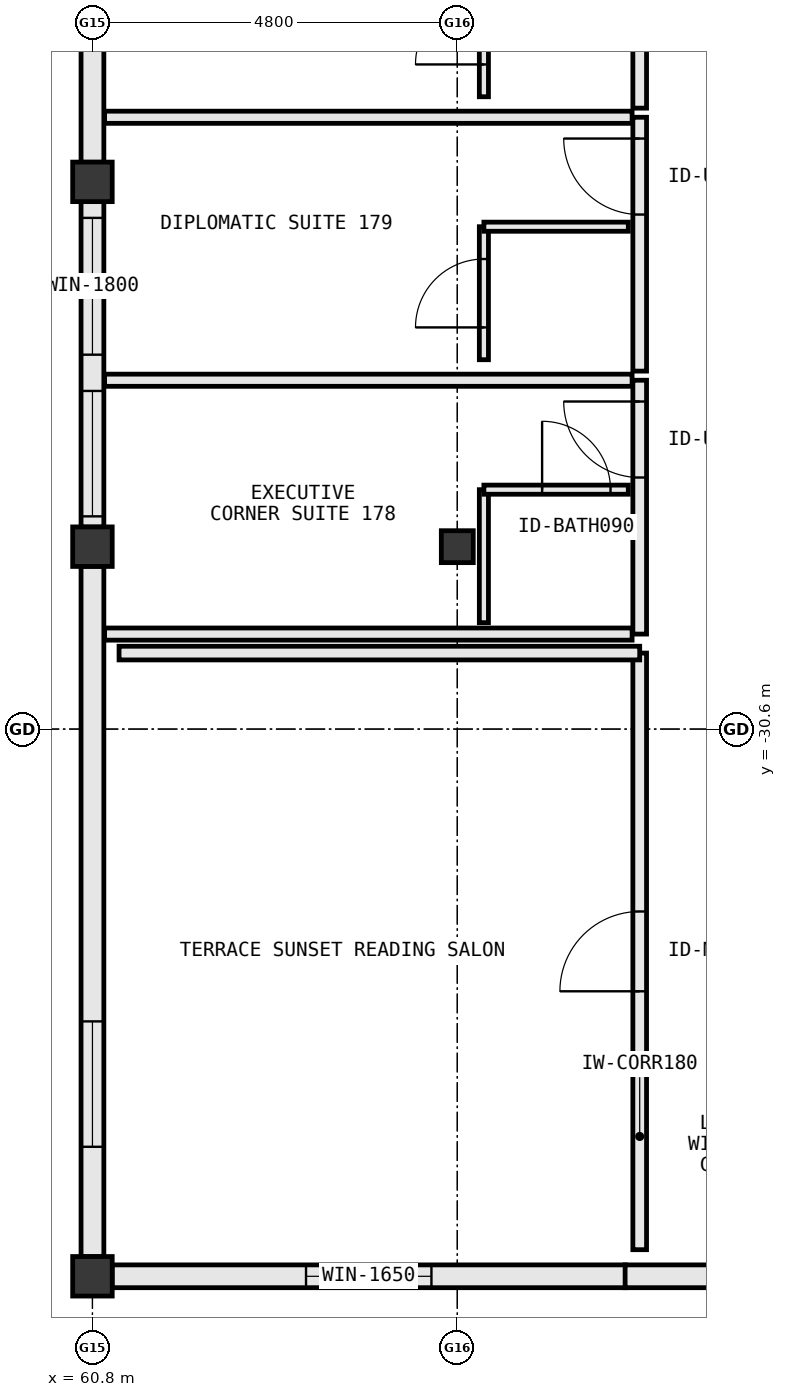
"""IFC4 building model, lengths in metres.
Left out: names, types, materials, properties, quantities, classifications, styles, units other than length and angle.
Written with IfcOpenShell. Run it as: python <this file> out.ifc"""

import sys

from ifc_helpers import new_model, si_unit, direction, frame, frame_2d, origin, origin_2d, place, context, subcontext, project, spatial, rectangle, extrude, element, fill, save


model = new_model("IFC4")
c1 = context("Model", 3, precision=1e-05, world=origin(), true_north=direction((0.0, 1.0)))
c2 = subcontext(c1, "Body", "Model", "MODEL_VIEW")
j1 = project(units=[si_unit("LENGTHUNIT", "METRE"), si_unit("PLANEANGLEUNIT", "RADIAN")], contexts=[c1])
p1 = place(None, origin())
s1 = spatial("IfcSite", under=j1, at=p1, CompositionType="ELEMENT")
p2 = place(p1, origin())
s2 = spatial("IfcBuilding", under=s1, at=p2, CompositionType="ELEMENT")
p3 = place(p2, frame((0.0, 0.0, 27.6)))
s3 = spatial("IfcBuildingStorey", under=s2, at=p3, CompositionType="ELEMENT", Elevation=27.6)
for number, where, z_axis, x_axis in (
    (1, (60.8, -37.8, 0.0), (0.0, 0.0, 1.0), (1.0, 0.0, 0.0)),
    (2, (60.8, -28.2, 0.0), (0.0, 0.0, 1.0), (1.0, 0.0, 0.0)),
    (3, (60.8, -23.4, 0.0), (0.0, 0.0, 1.0), (1.0, 0.0, 0.0)),
):
    element("IfcColumn", number, at=place(p3, frame(where, z_axis=z_axis, x_axis=x_axis)), inside=s3, PredefinedType="COLUMN", context=c2, shape_type="SweptSolid", body=[
        extrude(rectangle(XDim=0.52, YDim=0.52, at=origin_2d()), origin(), (0.0, 0.0, 1.0), 3.8),
    ])
p4 = place(p3, frame((65.6, -28.2, 0.0), z_axis=(0.0, 0.0, 1.0), x_axis=(1.0, 0.0, 0.0)))
e4 = element("IfcColumn", 4, at=p4, inside=s3, PredefinedType="COLUMN", context=c2, shape_type="SweptSolid", body=[
    extrude(rectangle(XDim=0.42, YDim=0.42, at=origin_2d()), origin(), (0.0, 0.0, 1.0), 3.8),
])
p5 = place(p3, frame((61.058, -37.8, 0.0), z_axis=(0.0, 0.0, 1.0), x_axis=(1.0, 0.0, 0.0)))
e5 = element("IfcWall", 5, at=p5, inside=s3, PredefinedType="STANDARD", context=c2, shape_type="SweptSolid", body=[
    extrude(rectangle(XDim=6.754, YDim=0.3, at=frame_2d((3.377, 0.0))), origin(), (0.0, 0.0, 1.0), 2.83),
])
p6 = place(p5, frame((2.552, 0.0, 0.85)))
e6 = element("IfcOpeningElement", 6, at=p6, cuts=e5, PredefinedType="OPENING", context=c2, shape_type="SweptSolid", body=[
    extrude(rectangle(XDim=1.65, YDim=1.8, at=frame_2d((0.825, 0.9))), frame((0.0, 0.162, 0.0), z_axis=(0.0, -1.0, 0.0), x_axis=(1.0, 0.0, 0.0)), (0.0, 0.0, 1.0), 0.324),
])
p7 = place(p3, frame((67.808, -37.8, 0.0), z_axis=(0.0, 0.0, 1.0), x_axis=(1.0, 0.0, 0.0)))
e7 = element("IfcWall", 7, at=p7, inside=s3, PredefinedType="STANDARD", context=c2, shape_type="SweptSolid", body=[
    extrude(rectangle(XDim=6.754, YDim=0.3, at=frame_2d((3.377, 0.0))), origin(), (0.0, 0.0, 1.0), 2.83),
])
p8 = place(p3, frame((60.8, -18.858, 0.0), z_axis=(0.0, 0.0, 1.0), x_axis=(0.0, -1.0, 0.0)))
e8 = element("IfcWall", 8, at=p8, inside=s3, PredefinedType="STANDARD", context=c2, shape_type="SweptSolid", body=[
    extrude(rectangle(XDim=4.284, YDim=0.3, at=frame_2d((2.142, 0.0))), origin(), (0.0, 0.0, 1.0), 3.01),
])
p9 = place(p8, frame((1.002, 0.0, 0.85)))
e9 = element("IfcOpeningElement", 9, at=p9, cuts=e8, PredefinedType="OPENING", context=c2, shape_type="SweptSolid", body=[
    extrude(rectangle(XDim=1.8, YDim=1.85, at=frame_2d((0.9, 0.925))), frame((0.0, 0.162, 0.0), z_axis=(0.0, -1.0, 0.0), x_axis=(1.0, 0.0, 0.0)), (0.0, 0.0, 1.0), 0.324),
])
p10 = place(p3, frame((60.8, -23.658, 0.0), z_axis=(0.0, 0.0, 1.0), x_axis=(0.0, -1.0, 0.0)))
e10 = element("IfcWall", 10, at=p10, inside=s3, PredefinedType="STANDARD", context=c2, shape_type="SweptSolid", body=[
    extrude(rectangle(XDim=4.284, YDim=0.3, at=frame_2d((2.142, 0.0))), origin(), (0.0, 0.0, 1.0), 3.01),
])
p11 = place(p10, frame((2.493, 0.0, 0.85)))
e11 = element("IfcOpeningElement", 11, at=p11, cuts=e10, PredefinedType="OPENING", context=c2, shape_type="SweptSolid", body=[
    extrude(rectangle(XDim=1.65, YDim=1.8, at=frame_2d((0.825, 0.9))), frame((0.0, 0.162, 0.0), z_axis=(0.0, -1.0, 0.0), x_axis=(1.0, 0.0, 0.0)), (0.0, 0.0, 1.0), 0.324),
])
p12 = place(p10, frame((0.216, 0.0, 0.85)))
e12 = element("IfcOpeningElement", 12, at=p12, cuts=e10, PredefinedType="OPENING", context=c2, shape_type="SweptSolid", body=[
    extrude(rectangle(XDim=1.8, YDim=1.85, at=frame_2d((0.9, 0.925))), frame((0.0, 0.162, 0.0), z_axis=(0.0, -1.0, 0.0), x_axis=(1.0, 0.0, 0.0)), (0.0, 0.0, 1.0), 0.324),
])
p13 = place(p3, frame((60.8, -28.458, 0.0), z_axis=(0.0, 0.0, 1.0), x_axis=(0.0, -1.0, 0.0)))
e13 = element("IfcWall", 13, at=p13, inside=s3, PredefinedType="STANDARD", context=c2, shape_type="SweptSolid", body=[
    extrude(rectangle(XDim=9.084, YDim=0.3, at=frame_2d((4.542, 0.0))), origin(), (0.0, 0.0, 1.0), 2.91),
])
p14 = place(p13, frame((5.988, 0.0, 0.85)))
e14 = element("IfcOpeningElement", 14, at=p14, cuts=e13, PredefinedType="OPENING", context=c2, shape_type="SweptSolid", body=[
    extrude(rectangle(XDim=1.65, YDim=1.8, at=frame_2d((0.825, 0.9))), frame((0.0, 0.162, 0.0), z_axis=(0.0, -1.0, 0.0), x_axis=(1.0, 0.0, 0.0)), (0.0, 0.0, 1.0), 0.324),
])
p15 = place(p3, frame((68.0, -37.45, 0.0), z_axis=(0.0, 0.0, 1.0), x_axis=(0.0, 1.0, 0.0)))
e15 = element("IfcWall", 15, at=p15, inside=s3, PredefinedType="PARTITIONING", context=c2, shape_type="SweptSolid", body=[
    extrude(rectangle(XDim=7.85, YDim=0.18, at=frame_2d((3.925, 0.0))), origin(), (0.0, 0.0, 1.0), 3.555),
])
p16 = place(p15, frame((3.4, 0.0, 0.0)))
e16 = element("IfcOpeningElement", 16, at=p16, cuts=e15, PredefinedType="OPENING", context=c2, shape_type="SweptSolid", body=[
    extrude(rectangle(XDim=1.05, YDim=2.2, at=frame_2d((0.525, 1.1))), frame((0.0, 0.102, 0.0), z_axis=(0.0, -1.0, 0.0), x_axis=(1.0, 0.0, 0.0)), (0.0, 0.0, 1.0), 0.204),
])
p17 = place(p3, frame((68.0, -29.6, 0.0), z_axis=(0.0, 0.0, 1.0), x_axis=(-1.0, 0.0, 0.0)))
e17 = element("IfcWall", 17, at=p17, inside=s3, PredefinedType="PARTITIONING", context=c2, shape_type="SweptSolid", body=[
    extrude(rectangle(XDim=6.85, YDim=0.18, at=frame_2d((3.425, 0.0))), origin(), (0.0, 0.0, 1.0), 3.555),
])
p18 = place(p3, frame((68.0, -29.35, 0.0), z_axis=(0.0, 0.0, 1.0), x_axis=(0.0, 1.0, 0.0)))
e18 = element("IfcWall", 18, at=p18, inside=s3, PredefinedType="PARTITIONING", context=c2, shape_type="SweptSolid", body=[
    extrude(rectangle(XDim=3.34, YDim=0.18, at=frame_2d((1.67, 0.0))), origin(), (0.0, 0.0, 1.0), 3.555),
])
p19 = place(p18, frame((2.06, 0.0, 0.0)))
e19 = element("IfcOpeningElement", 19, at=p19, cuts=e18, PredefinedType="OPENING", context=c2, shape_type="SweptSolid", body=[
    extrude(rectangle(XDim=1.0, YDim=2.2, at=frame_2d((0.5, 1.1))), frame((0.0, 0.102, 0.0), z_axis=(0.0, -1.0, 0.0), x_axis=(1.0, 0.0, 0.0)), (0.0, 0.0, 1.0), 0.204),
])
for number, where, z_axis, x_axis in (
    (20, (60.96, -29.35, 0.0), (0.0, 0.0, 1.0), (1.0, 0.0, 0.0)),
    (21, (60.96, -26.01, 0.0), (0.0, 0.0, 1.0), (1.0, 0.0, 0.0)),
):
    element("IfcWall", number, at=place(p3, frame(where, z_axis=z_axis, x_axis=x_axis)), inside=s3, PredefinedType="PARTITIONING", context=c2, shape_type="SweptSolid", body=[
        extrude(rectangle(XDim=6.94, YDim=0.16, at=frame_2d((3.47, 0.0))), origin(), (0.0, 0.0, 1.0), 3.555),
    ])
p20 = place(p3, frame((65.95, -29.2, 0.0), z_axis=(0.0, 0.0, 1.0), x_axis=(0.0, 1.0, 0.0)))
e22 = element("IfcWall", 22, at=p20, inside=s3, PredefinedType="PARTITIONING", context=c2, shape_type="SweptSolid", body=[
    extrude(rectangle(XDim=1.75, YDim=0.12, at=frame_2d((0.875, 0.0))), origin(), (0.0, 0.0, 1.0), 2.91),
])
p21 = place(p3, frame((65.95, -27.45, 0.0), z_axis=(0.0, 0.0, 1.0), x_axis=(1.0, 0.0, 0.0)))
e23 = element("IfcWall", 23, at=p21, inside=s3, PredefinedType="PARTITIONING", context=c2, shape_type="SweptSolid", body=[
    extrude(rectangle(XDim=1.9, YDim=0.12, at=frame_2d((0.95, 0.0))), origin(), (0.0, 0.0, 1.0), 3.555),
])
p22 = place(p21, frame((0.766, 0.0, 0.0)))
e24 = element("IfcOpeningElement", 24, at=p22, cuts=e23, PredefinedType="OPENING", context=c2, shape_type="SweptSolid", body=[
    extrude(rectangle(XDim=0.9, YDim=2.15, at=frame_2d((0.45, 1.075))), frame((0.0, 0.072, 0.0), z_axis=(0.0, -1.0, 0.0), x_axis=(1.0, 0.0, 0.0)), (0.0, 0.0, 1.0), 0.144),
])
p23 = place(p3, frame((68.0, -25.89, 0.0), z_axis=(0.0, 0.0, 1.0), x_axis=(0.0, 1.0, 0.0)))
e25 = element("IfcWall", 25, at=p23, inside=s3, PredefinedType="PARTITIONING", context=c2, shape_type="SweptSolid", body=[
    extrude(rectangle(XDim=3.34, YDim=0.18, at=frame_2d((1.67, 0.0))), origin(), (0.0, 0.0, 1.0), 3.555),
])
p24 = place(p23, frame((2.06, 0.0, 0.0)))
e26 = element("IfcOpeningElement", 26, at=p24, cuts=e25, PredefinedType="OPENING", context=c2, shape_type="SweptSolid", body=[
    extrude(rectangle(XDim=1.0, YDim=2.2, at=frame_2d((0.5, 1.1))), frame((0.0, 0.102, 0.0), z_axis=(0.0, -1.0, 0.0), x_axis=(1.0, 0.0, 0.0)), (0.0, 0.0, 1.0), 0.204),
])
p25 = place(p3, frame((60.96, -22.55, 0.0), z_axis=(0.0, 0.0, 1.0), x_axis=(1.0, 0.0, 0.0)))
e27 = element("IfcWall", 27, at=p25, inside=s3, PredefinedType="PARTITIONING", context=c2, shape_type="SweptSolid", body=[
    extrude(rectangle(XDim=6.94, YDim=0.16, at=frame_2d((3.47, 0.0))), origin(), (0.0, 0.0, 1.0), 3.555),
])
p26 = place(p3, frame((65.95, -25.74, 0.0), z_axis=(0.0, 0.0, 1.0), x_axis=(0.0, 1.0, 0.0)))
e28 = element("IfcWall", 28, at=p26, inside=s3, PredefinedType="PARTITIONING", context=c2, shape_type="SweptSolid", body=[
    extrude(rectangle(XDim=1.75, YDim=0.12, at=frame_2d((0.875, 0.0))), origin(), (0.0, 0.0, 1.0), 2.91),
])
p27 = place(p26, frame((0.425, 0.0, 0.0)))
e29 = element("IfcOpeningElement", 29, at=p27, cuts=e28, PredefinedType="OPENING", context=c2, shape_type="SweptSolid", body=[
    extrude(rectangle(XDim=0.9, YDim=2.15, at=frame_2d((0.45, 1.075))), frame((0.0, 0.072, 0.0), z_axis=(0.0, -1.0, 0.0), x_axis=(1.0, 0.0, 0.0)), (0.0, 0.0, 1.0), 0.144),
])
p28 = place(p3, frame((65.95, -23.99, 0.0), z_axis=(0.0, 0.0, 1.0), x_axis=(1.0, 0.0, 0.0)))
e30 = element("IfcWall", 30, at=p28, inside=s3, PredefinedType="PARTITIONING", context=c2, shape_type="SweptSolid", body=[
    extrude(rectangle(XDim=1.9, YDim=0.12, at=frame_2d((0.95, 0.0))), origin(), (0.0, 0.0, 1.0), 3.555),
])
p29 = place(p3, frame((68.0, -22.43, 0.0), z_axis=(0.0, 0.0, 1.0), x_axis=(0.0, 1.0, 0.0)))
e31 = element("IfcWall", 31, at=p29, inside=s3, PredefinedType="PARTITIONING", context=c2, shape_type="SweptSolid", body=[
    extrude(rectangle(XDim=3.34, YDim=0.18, at=frame_2d((1.67, 0.0))), origin(), (0.0, 0.0, 1.0), 3.555),
])
p30 = place(p29, frame((2.06, 0.0, 0.0)))
e32 = element("IfcOpeningElement", 32, at=p30, cuts=e31, PredefinedType="OPENING", context=c2, shape_type="SweptSolid", body=[
    extrude(rectangle(XDim=1.0, YDim=2.2, at=frame_2d((0.5, 1.1))), frame((0.0, 0.102, 0.0), z_axis=(0.0, -1.0, 0.0), x_axis=(1.0, 0.0, 0.0)), (0.0, 0.0, 1.0), 0.204),
])
p31 = place(p3, frame((65.95, -22.28, 0.0), z_axis=(0.0, 0.0, 1.0), x_axis=(0.0, 1.0, 0.0)))
e33 = element("IfcWall", 33, at=p31, inside=s3, PredefinedType="PARTITIONING", context=c2, shape_type="SweptSolid", body=[
    extrude(rectangle(XDim=1.75, YDim=0.12, at=frame_2d((0.875, 0.0))), origin(), (0.0, 0.0, 1.0), 2.91),
])
p32 = place(p31, frame((0.425, 0.0, 0.0)))
e34 = element("IfcOpeningElement", 34, at=p32, cuts=e33, PredefinedType="OPENING", context=c2, shape_type="SweptSolid", body=[
    extrude(rectangle(XDim=0.9, YDim=2.15, at=frame_2d((0.45, 1.075))), frame((0.0, 0.072, 0.0), z_axis=(0.0, -1.0, 0.0), x_axis=(1.0, 0.0, 0.0)), (0.0, 0.0, 1.0), 0.144),
])
p33 = place(p6, origin())
e35 = element("IfcWindow", 35, at=p33, inside=s3, PartitioningType="SINGLE_PANEL", PredefinedType="WINDOW", context=c2, shape_type="SweptSolid", body=[
    extrude(rectangle(XDim=1.65, YDim=1.8, at=frame_2d((0.825, 0.9))), frame((0.0, 0.03, 0.0), z_axis=(0.0, -1.0, 0.0), x_axis=(1.0, 0.0, 0.0)), (0.0, 0.0, 1.0), 0.06),
])
fill(e6, e35)
p34 = place(p14, origin())
e36 = element("IfcWindow", 36, at=p34, inside=s3, PartitioningType="SINGLE_PANEL", PredefinedType="WINDOW", context=c2, shape_type="SweptSolid", body=[
    extrude(rectangle(XDim=1.65, YDim=1.8, at=frame_2d((0.825, 0.9))), frame((0.0, 0.03, 0.0), z_axis=(0.0, -1.0, 0.0), x_axis=(1.0, 0.0, 0.0)), (0.0, 0.0, 1.0), 0.06),
])
fill(e14, e36)
p35 = place(p11, origin())
e37 = element("IfcWindow", 37, at=p35, inside=s3, PartitioningType="SINGLE_PANEL", PredefinedType="WINDOW", context=c2, shape_type="SweptSolid", body=[
    extrude(rectangle(XDim=1.65, YDim=1.8, at=frame_2d((0.825, 0.9))), frame((0.0, 0.03, 0.0), z_axis=(0.0, -1.0, 0.0), x_axis=(1.0, 0.0, 0.0)), (0.0, 0.0, 1.0), 0.06),
])
fill(e11, e37)
p36 = place(p12, origin())
e38 = element("IfcWindow", 38, at=p36, inside=s3, PartitioningType="SINGLE_PANEL", PredefinedType="WINDOW", context=c2, shape_type="SweptSolid", body=[
    extrude(rectangle(XDim=1.8, YDim=1.85, at=frame_2d((0.9, 0.925))), frame((0.0, 0.03, 0.0), z_axis=(0.0, -1.0, 0.0), x_axis=(1.0, 0.0, 0.0)), (0.0, 0.0, 1.0), 0.06),
])
fill(e12, e38)
p37 = place(p16, origin())
e39 = element("IfcDoor", 39, at=p37, inside=s3, OperationType="SINGLE_SWING_LEFT", PredefinedType="DOOR", context=c2, shape_type="SweptSolid", body=[
    extrude(rectangle(XDim=1.05, YDim=2.2, at=frame_2d((0.525, 1.1))), frame((0.0, 0.025, 0.0), z_axis=(0.0, -1.0, 0.0), x_axis=(1.0, 0.0, 0.0)), (0.0, 0.0, 1.0), 0.05),
])
fill(e16, e39)
p38 = place(p19, origin())
e40 = element("IfcDoor", 40, at=p38, inside=s3, OperationType="SINGLE_SWING_RIGHT", PredefinedType="DOOR", context=c2, shape_type="SweptSolid", body=[
    extrude(rectangle(XDim=1.0, YDim=2.2, at=frame_2d((0.5, 1.1))), frame((0.0, 0.025, 0.0), z_axis=(0.0, -1.0, 0.0), x_axis=(1.0, 0.0, 0.0)), (0.0, 0.0, 1.0), 0.05),
])
fill(e19, e40)
p39 = place(p22, origin())
e41 = element("IfcDoor", 41, at=p39, inside=s3, OperationType="SINGLE_SWING_LEFT", PredefinedType="DOOR", context=c2, shape_type="SweptSolid", body=[
    extrude(rectangle(XDim=0.9, YDim=2.15, at=frame_2d((0.45, 1.075))), frame((0.0, 0.025, 0.0), z_axis=(0.0, -1.0, 0.0), x_axis=(1.0, 0.0, 0.0)), (0.0, 0.0, 1.0), 0.05),
])
fill(e24, e41)
p40 = place(p24, origin())
e42 = element("IfcDoor", 42, at=p40, inside=s3, OperationType="SINGLE_SWING_RIGHT", PredefinedType="DOOR", context=c2, shape_type="SweptSolid", body=[
    extrude(rectangle(XDim=1.0, YDim=2.2, at=frame_2d((0.5, 1.1))), frame((0.0, 0.025, 0.0), z_axis=(0.0, -1.0, 0.0), x_axis=(1.0, 0.0, 0.0)), (0.0, 0.0, 1.0), 0.05),
])
fill(e26, e42)
p41 = place(p27, origin())
e43 = element("IfcDoor", 43, at=p41, inside=s3, OperationType="SINGLE_SWING_LEFT", PredefinedType="DOOR", context=c2, shape_type="SweptSolid", body=[
    extrude(rectangle(XDim=0.9, YDim=2.15, at=frame_2d((0.45, 1.075))), frame((0.0, 0.025, 0.0), z_axis=(0.0, -1.0, 0.0), x_axis=(1.0, 0.0, 0.0)), (0.0, 0.0, 1.0), 0.05),
])
fill(e29, e43)
p42 = place(p32, origin())
e44 = element("IfcDoor", 44, at=p42, inside=s3, OperationType="SINGLE_SWING_LEFT", PredefinedType="DOOR", context=c2, shape_type="SweptSolid", body=[
    extrude(rectangle(XDim=0.9, YDim=2.15, at=frame_2d((0.45, 1.075))), frame((0.0, 0.025, 0.0), z_axis=(0.0, -1.0, 0.0), x_axis=(1.0, 0.0, 0.0)), (0.0, 0.0, 1.0), 0.05),
])
fill(e34, e44)
save(model, sys.argv[1])
